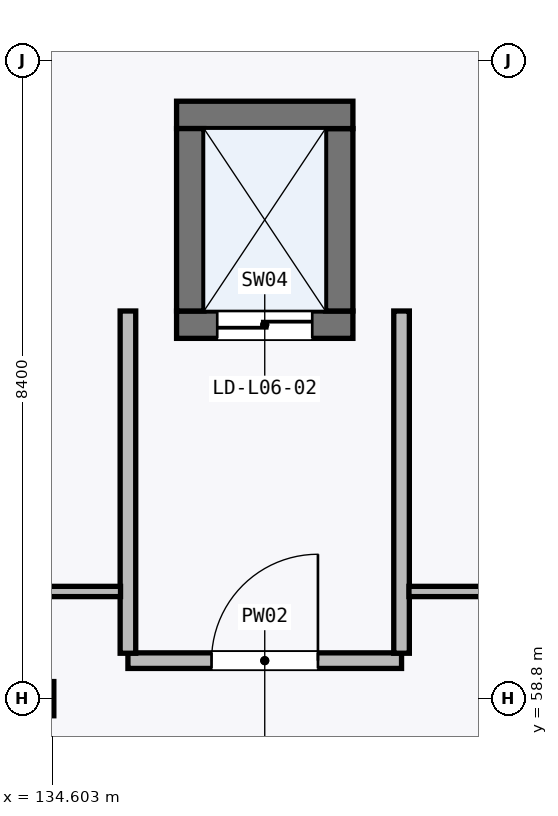
"""IFC4 building model, lengths in metres.
Left out: names, types, materials, properties, quantities, classifications, styles, units other than length and angle.
Written with IfcOpenShell. Run it as: python <this file> out.ifc"""

import sys

from ifc_helpers import new_model, si_unit, direction, frame, frame_2d, origin, origin_2d, place, context, subcontext, project, spatial, rectangle, hollow_rectangle, extrude, element, fill, save


model = new_model("IFC4")
c1 = context("Model", 3, precision=1e-05, world=origin(), true_north=direction((0.0, 1.0)))
c2 = subcontext(c1, "Body", "Model", "MODEL_VIEW")
j1 = project(units=[si_unit("LENGTHUNIT", "METRE"), si_unit("PLANEANGLEUNIT", "RADIAN")], contexts=[c1])
p1 = place(None, origin())
s1 = spatial("IfcSite", under=j1, at=p1, CompositionType="ELEMENT")
p2 = place(p1, origin())
s2 = spatial("IfcBuilding", under=s1, at=p2, CompositionType="ELEMENT")
p3 = place(p2, frame((0.0, 0.0, 26.7)))
s3 = spatial("IfcBuildingStorey", under=s2, at=p3, CompositionType="ELEMENT", Elevation=26.7)
p4 = place(p3, frame((134.4, 58.8, 0.0), z_axis=(0.0, 0.0, 1.0), x_axis=(1.0, 0.0, 0.0)))
e1 = element("IfcColumn", 1, at=p4, inside=s3, PredefinedType="COLUMN", context=c2, shape_type="SweptSolid", body=[
    extrude(hollow_rectangle(XDim=0.45, YDim=0.45, WallThickness=0.018, at=origin_2d()), origin(), (0.0, 0.0, 1.0), 5.1),
])
p5 = place(p3, frame((136.24, 63.72, 0.0), z_axis=(0.0, 0.0, 1.0), x_axis=(1.0, 0.0, 0.0)))
e2 = element("IfcWall", 2, at=p5, inside=s3, PredefinedType="SHEAR", context=c2, shape_type="SweptSolid", body=[
    extrude(rectangle(XDim=2.32, YDim=0.36, at=frame_2d((1.16, 0.0))), origin(), (0.0, 0.0, 1.0), 4.845),
])
p6 = place(p5, frame((0.535, 0.0, 0.0)))
e3 = element("IfcOpeningElement", 3, at=p6, cuts=e2, PredefinedType="OPENING", context=c2, shape_type="SweptSolid", body=[
    extrude(rectangle(XDim=1.25, YDim=2.2, at=frame_2d((0.625, 1.1))), frame((0.0, 0.19, 0.0), z_axis=(0.0, -1.0, 0.0), x_axis=(1.0, 0.0, 0.0)), (0.0, 0.0, 1.0), 0.38),
])
p7 = place(p3, frame((138.38, 63.9, 0.0), z_axis=(0.0, 0.0, 1.0), x_axis=(0.0, 1.0, 0.0)))
e4 = element("IfcWall", 4, at=p7, inside=s3, PredefinedType="SHEAR", context=c2, shape_type="SweptSolid", body=[
    extrude(rectangle(XDim=2.4, YDim=0.36, at=frame_2d((1.2, 0.0))), origin(), (0.0, 0.0, 1.0), 4.845),
])
p8 = place(p3, frame((138.56, 66.48, 0.0), z_axis=(0.0, 0.0, 1.0), x_axis=(-1.0, 0.0, 0.0)))
e5 = element("IfcWall", 5, at=p8, inside=s3, PredefinedType="SHEAR", context=c2, shape_type="SweptSolid", body=[
    extrude(rectangle(XDim=2.32, YDim=0.36, at=frame_2d((1.16, 0.0))), origin(), (0.0, 0.0, 1.0), 4.845),
])
p9 = place(p3, frame((136.42, 66.3, 0.0), z_axis=(0.0, 0.0, 1.0), x_axis=(0.0, -1.0, 0.0)))
e6 = element("IfcWall", 6, at=p9, inside=s3, PredefinedType="SHEAR", context=c2, shape_type="SweptSolid", body=[
    extrude(rectangle(XDim=2.4, YDim=0.36, at=frame_2d((1.2, 0.0))), origin(), (0.0, 0.0, 1.0), 4.845),
])
p10 = place(p3, frame((135.6, 59.3, 0.0), z_axis=(0.0, 0.0, 1.0), x_axis=(1.0, 0.0, 0.0)))
e7 = element("IfcWall", 7, at=p10, inside=s3, PredefinedType="PARTITIONING", context=c2, shape_type="SweptSolid", body=[
    extrude(rectangle(XDim=3.6, YDim=0.205, at=frame_2d((1.8, 0.0))), origin(), (0.0, 0.0, 1.0), 4.845),
])
p11 = place(p10, frame((1.1, 0.0, 0.0)))
e8 = element("IfcOpeningElement", 8, at=p11, cuts=e7, PredefinedType="OPENING", context=c2, shape_type="SweptSolid", body=[
    extrude(rectangle(XDim=1.4, YDim=2.15, at=frame_2d((0.7, 1.075))), frame((0.0, 0.113, 0.0), z_axis=(0.0, -1.0, 0.0), x_axis=(1.0, 0.0, 0.0)), (0.0, 0.0, 1.0), 0.225),
])
for number, where, z_axis, x_axis in (
    (9, (139.2, 59.397, 0.0), (0.0, 0.0, 1.0), (0.0, 1.0, 0.0)),
    (10, (135.6, 63.9, 0.0), (0.0, 0.0, 1.0), (0.0, -1.0, 0.0)),
):
    element("IfcWall", number, at=place(p3, frame(where, z_axis=z_axis, x_axis=x_axis)), inside=s3, PredefinedType="PARTITIONING", context=c2, shape_type="SweptSolid", body=[
        extrude(rectangle(XDim=4.502, YDim=0.205, at=frame_2d((2.251, 0.0))), origin(), (0.0, 0.0, 1.0), 4.845),
    ])
p12 = place(p3, frame((139.298, 60.21, 0.0), z_axis=(0.0, 0.0, 1.0), x_axis=(1.0, 0.0, 0.0)))
e11 = element("IfcWall", 11, at=p12, inside=s3, PredefinedType="PARTITIONING", context=c2, shape_type="SweptSolid", body=[
    extrude(rectangle(XDim=3.702, YDim=0.135, at=frame_2d((1.851, 0.0))), origin(), (0.0, 0.0, 1.0), 4.845),
])
p13 = place(p3, frame((127.3, 60.21, 0.0), z_axis=(0.0, 0.0, 1.0), x_axis=(1.0, 0.0, 0.0)))
e12 = element("IfcWall", 12, at=p13, inside=s3, PredefinedType="PARTITIONING", context=c2, shape_type="SweptSolid", body=[
    extrude(rectangle(XDim=8.202, YDim=0.135, at=frame_2d((4.101, 0.0))), origin(), (0.0, 0.0, 1.0), 4.845),
])
p14 = place(p6, frame((1.25, 0.0, 0.0), z_axis=(0.0, 0.0, 1.0), x_axis=(-1.0, 0.0, 0.0)))
e13 = element("IfcDoor", 13, at=p14, inside=s3, OperationType="DOUBLE_DOOR_SLIDING", PredefinedType="DOOR", context=c2, shape_type="SweptSolid", body=[
    extrude(rectangle(XDim=1.25, YDim=2.2, at=frame_2d((0.625, 1.1))), frame((0.0, 0.025, 0.0), z_axis=(0.0, -1.0, 0.0), x_axis=(1.0, 0.0, 0.0)), (0.0, 0.0, 1.0), 0.05),
])
fill(e3, e13)
p15 = place(p11, origin())
e14 = element("IfcDoor", 14, at=p15, inside=s3, OperationType="SINGLE_SWING_RIGHT", PredefinedType="DOOR", context=c2, shape_type="SweptSolid", body=[
    extrude(rectangle(XDim=1.4, YDim=2.15, at=frame_2d((0.7, 1.075))), frame((0.0, 0.025, 0.0), z_axis=(0.0, -1.0, 0.0), x_axis=(1.0, 0.0, 0.0)), (0.0, 0.0, 1.0), 0.05),
])
fill(e8, e14)
save(model, sys.argv[1])
